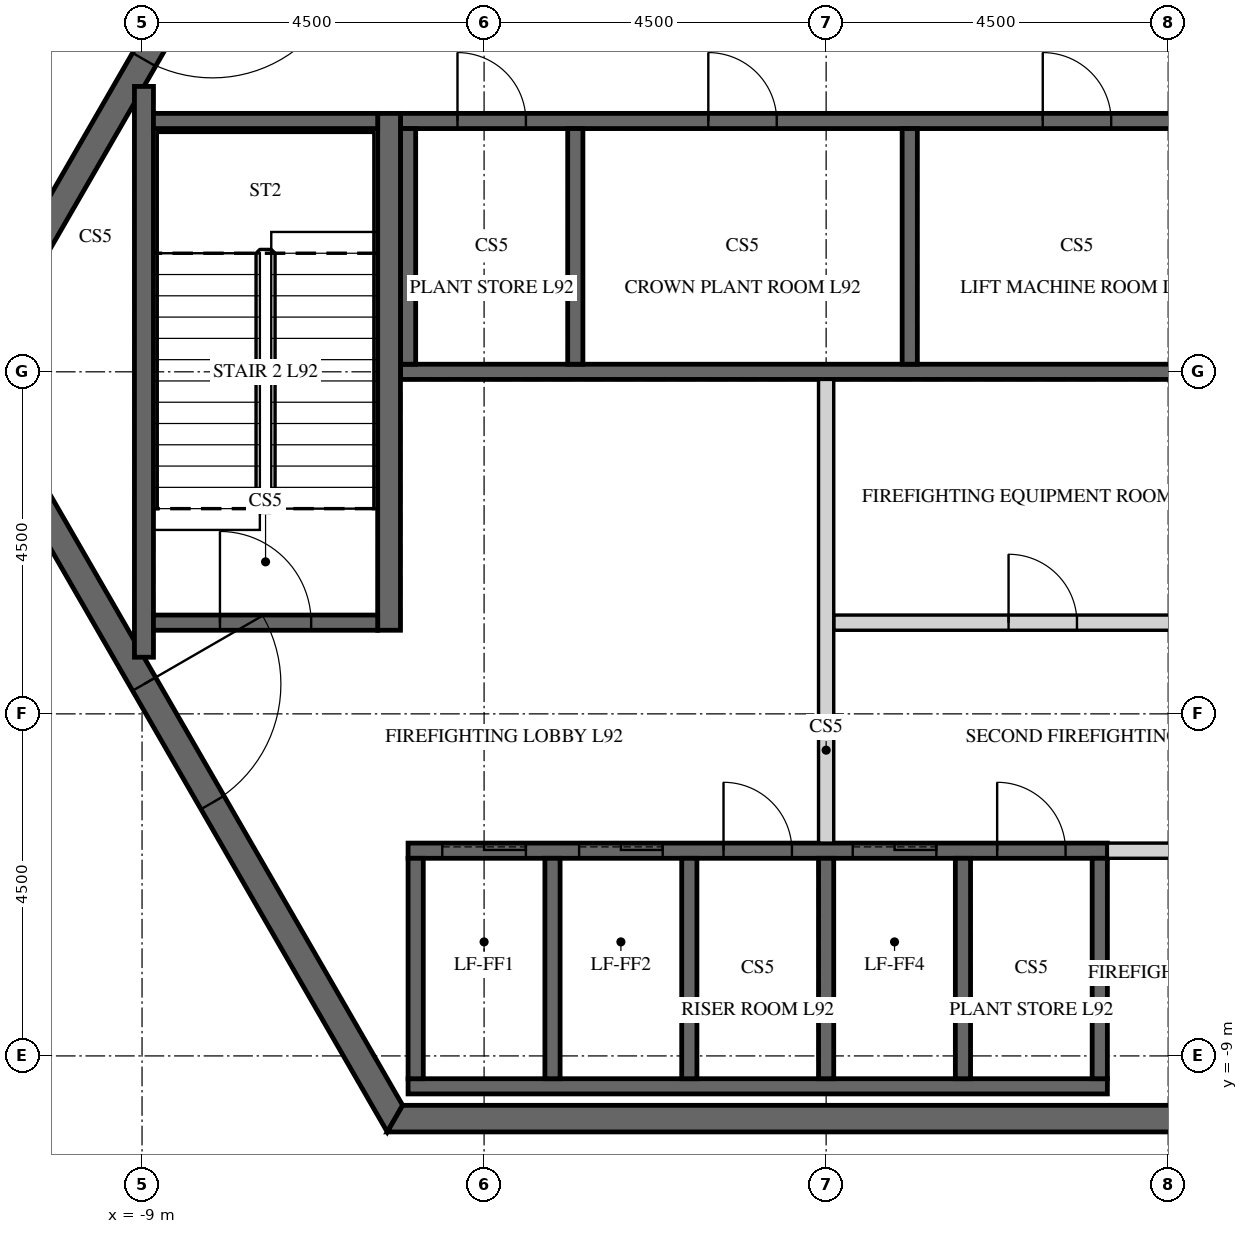
"""IFC4 building model, lengths in metres.
Left out: names, types, materials, properties, quantities, classifications, styles, units other than length and angle.
Written with IfcOpenShell. Run it as: python <this file> out.ifc"""

import sys

from ifc_helpers import new_model, si_unit, direction, frame, frame_2d, origin, place, context, subcontext, project, spatial, polyline, rectangle, outline, extrude, element, fill, save


model = new_model("IFC4")
c1 = context("Model", 3, precision=1e-05, world=origin(), true_north=direction((0.0, 1.0)))
c2 = subcontext(c1, "Body", "Model", "MODEL_VIEW")
j1 = project(units=[si_unit("LENGTHUNIT", "METRE"), si_unit("PLANEANGLEUNIT", "RADIAN")], contexts=[c1])
p1 = place(None, origin())
s1 = spatial("IfcSite", under=j1, at=p1, CompositionType="ELEMENT")
p2 = place(p1, origin())
s2 = spatial("IfcBuilding", under=s1, at=p2, CompositionType="ELEMENT")
p3 = place(p2, frame((0.0, 0.0, 388.2)))
s3 = spatial("IfcBuildingStorey", under=s2, at=p3, CompositionType="ELEMENT", Elevation=388.2)
p4 = place(p3, frame((-5.673, 9.825, -0.2), z_axis=(0.0, 0.0, 1.0), x_axis=(-0.499995046907, -0.866028263435, 0.0)))
e1 = element("IfcWall", 1, at=p4, inside=s3, PredefinedType="SHEAR", context=c2, shape_type="SweptSolid", body=[
    extrude(outline(polyline([(-0.101, -0.175), (11.446, -0.175), (11.244, 0.175), (0.101, 0.175), (-0.101, -0.175)])), origin(), (0.0, 0.0, 1.0), 4.5),
])
p5 = place(p4, frame((4.801, 0.0, 0.2)))
e2 = element("IfcOpeningElement", 2, at=p5, cuts=e1, PredefinedType="OPENING", context=c2, shape_type="SweptSolid", body=[
    extrude(rectangle(XDim=1.8, YDim=2.4, at=frame_2d((0.9, 1.2))), frame((0.0, 0.185, 0.0), z_axis=(0.0, -1.0, 0.0), x_axis=(1.0, 0.0, 0.0)), (0.0, 0.0, 1.0), 0.37),
])
p6 = place(p3, frame((-11.345, 0.0, -0.2), z_axis=(0.0, 0.0, 1.0), x_axis=(0.499995046907, -0.866028263435, 0.0)))
e3 = element("IfcWall", 3, at=p6, inside=s3, PredefinedType="SHEAR", context=c2, shape_type="SweptSolid", body=[
    extrude(outline(polyline([(-0.101, -0.175), (11.446, -0.175), (11.244, 0.175), (0.101, 0.175), (-0.101, -0.175)])), origin(), (0.0, 0.0, 1.0), 4.5),
])
p7 = place(p6, frame((4.744, 0.0, 0.2)))
e4 = element("IfcOpeningElement", 4, at=p7, cuts=e3, PredefinedType="OPENING", context=c2, shape_type="SweptSolid", body=[
    extrude(rectangle(XDim=1.8, YDim=2.4, at=frame_2d((0.9, 1.2))), frame((0.0, 0.185, 0.0), z_axis=(0.0, -1.0, 0.0), x_axis=(1.0, 0.0, 0.0)), (0.0, 0.0, 1.0), 0.37),
])
p8 = place(p3, frame((-5.673, -9.825, -0.2), z_axis=(0.0, 0.0, 1.0), x_axis=(1.0, 0.0, 0.0)))
e5 = element("IfcWall", 5, at=p8, inside=s3, PredefinedType="SHEAR", context=c2, shape_type="SweptSolid", body=[
    extrude(outline(polyline([(-0.101, -0.175), (11.446, -0.175), (11.244, 0.175), (0.101, 0.175), (-0.101, -0.175)])), origin(), (0.0, 0.0, 1.0), 4.5),
])
p9 = place(p3, frame((-5.6, 3.3, -0.2), z_axis=(0.0, 0.0, 1.0), x_axis=(1.0, 0.0, 0.0)))
e6 = element("IfcWall", 6, at=p9, inside=s3, PredefinedType="SHEAR", context=c2, shape_type="SweptSolid", body=[
    extrude(rectangle(XDim=11.2, YDim=0.2, at=frame_2d((5.6, 0.0))), origin(), (0.0, 0.0, 1.0), 4.5),
])
p10 = place(p9, frame((0.75, 0.0, 0.2)))
e7 = element("IfcOpeningElement", 7, at=p10, cuts=e6, PredefinedType="OPENING", context=c2, shape_type="SweptSolid", body=[
    extrude(rectangle(XDim=0.9, YDim=2.1, at=frame_2d((0.45, 1.05))), frame((0.0, 0.11, 0.0), z_axis=(0.0, -1.0, 0.0), x_axis=(1.0, 0.0, 0.0)), (0.0, 0.0, 1.0), 0.22),
])
p11 = place(p9, frame((4.05, 0.0, 0.2)))
e8 = element("IfcOpeningElement", 8, at=p11, cuts=e6, PredefinedType="OPENING", context=c2, shape_type="SweptSolid", body=[
    extrude(rectangle(XDim=0.9, YDim=2.1, at=frame_2d((0.45, 1.05))), frame((0.0, 0.11, 0.0), z_axis=(0.0, -1.0, 0.0), x_axis=(1.0, 0.0, 0.0)), (0.0, 0.0, 1.0), 0.22),
])
p12 = place(p9, frame((8.45, 0.0, 0.2)))
e9 = element("IfcOpeningElement", 9, at=p12, cuts=e6, PredefinedType="OPENING", context=c2, shape_type="SweptSolid", body=[
    extrude(rectangle(XDim=0.9, YDim=2.1, at=frame_2d((0.45, 1.05))), frame((0.0, 0.11, 0.0), z_axis=(0.0, -1.0, 0.0), x_axis=(1.0, 0.0, 0.0)), (0.0, 0.0, 1.0), 0.22),
])
p13 = place(p3, frame((-5.6, 0.0, -0.2), z_axis=(0.0, 0.0, 1.0), x_axis=(1.0, 0.0, 0.0)))
e10 = element("IfcWall", 10, at=p13, inside=s3, PredefinedType="SHEAR", context=c2, shape_type="SweptSolid", body=[
    extrude(rectangle(XDim=11.2, YDim=0.2, at=frame_2d((5.6, 0.0))), origin(), (0.0, 0.0, 1.0), 4.5),
])
for number, where, z_axis, x_axis in (
    (11, (-5.5, 0.1, -0.2), (0.0, 0.0, 1.0), (0.0, 1.0, 0.0)),
    (12, (-3.3, 0.1, -0.2), (0.0, 0.0, 1.0), (0.0, 1.0, 0.0)),
    (13, (1.1, 0.1, -0.2), (0.0, 0.0, 1.0), (0.0, 1.0, 0.0)),
):
    element("IfcWall", number, at=place(p3, frame(where, z_axis=z_axis, x_axis=x_axis)), inside=s3, PredefinedType="SHEAR", context=c2, shape_type="SweptSolid", body=[
        extrude(rectangle(XDim=3.1, YDim=0.2, at=frame_2d((1.55, 0.0))), origin(), (0.0, 0.0, 1.0), 4.5),
    ])
p14 = place(p3, frame((-5.5, -6.3, -0.2), z_axis=(0.0, 0.0, 1.0), x_axis=(1.0, 0.0, 0.0)))
e14 = element("IfcWall", 14, at=p14, inside=s3, PredefinedType="SHEAR", context=c2, shape_type="SweptSolid", body=[
    extrude(rectangle(XDim=9.2, YDim=0.2, at=frame_2d((4.6, 0.0))), origin(), (0.0, 0.0, 1.0), 4.5),
])
p15 = place(p14, frame((4.15, 0.0, 0.2)))
e15 = element("IfcOpeningElement", 15, at=p15, cuts=e14, PredefinedType="OPENING", context=c2, shape_type="SweptSolid", body=[
    extrude(rectangle(XDim=0.9, YDim=2.1, at=frame_2d((0.45, 1.05))), frame((0.0, 0.11, 0.0), z_axis=(0.0, -1.0, 0.0), x_axis=(1.0, 0.0, 0.0)), (0.0, 0.0, 1.0), 0.22),
])
p16 = place(p14, frame((7.75, 0.0, 0.2)))
e16 = element("IfcOpeningElement", 16, at=p16, cuts=e14, PredefinedType="OPENING", context=c2, shape_type="SweptSolid", body=[
    extrude(rectangle(XDim=0.9, YDim=2.1, at=frame_2d((0.45, 1.05))), frame((0.0, 0.11, 0.0), z_axis=(0.0, -1.0, 0.0), x_axis=(1.0, 0.0, 0.0)), (0.0, 0.0, 1.0), 0.22),
])
p17 = place(p14, frame((0.45, 0.0, 0.2)))
e17 = element("IfcOpeningElement", 17, at=p17, cuts=e14, PredefinedType="OPENING", context=c2, shape_type="SweptSolid", body=[
    extrude(rectangle(XDim=1.1, YDim=2.1, at=frame_2d((0.55, 1.05))), frame((0.0, 0.11, 0.0), z_axis=(0.0, -1.0, 0.0), x_axis=(1.0, 0.0, 0.0)), (0.0, 0.0, 1.0), 0.22),
])
p18 = place(p14, frame((2.25, 0.0, 0.2)))
e18 = element("IfcOpeningElement", 18, at=p18, cuts=e14, PredefinedType="OPENING", context=c2, shape_type="SweptSolid", body=[
    extrude(rectangle(XDim=1.1, YDim=2.1, at=frame_2d((0.55, 1.05))), frame((0.0, 0.11, 0.0), z_axis=(0.0, -1.0, 0.0), x_axis=(1.0, 0.0, 0.0)), (0.0, 0.0, 1.0), 0.22),
])
p19 = place(p14, frame((5.85, 0.0, 0.2)))
e19 = element("IfcOpeningElement", 19, at=p19, cuts=e14, PredefinedType="OPENING", context=c2, shape_type="SweptSolid", body=[
    extrude(rectangle(XDim=1.1, YDim=2.1, at=frame_2d((0.55, 1.05))), frame((0.0, 0.11, 0.0), z_axis=(0.0, -1.0, 0.0), x_axis=(1.0, 0.0, 0.0)), (0.0, 0.0, 1.0), 0.22),
])
p20 = place(p3, frame((-5.5, -9.4, -0.2), z_axis=(0.0, 0.0, 1.0), x_axis=(1.0, 0.0, 0.0)))
e20 = element("IfcWall", 20, at=p20, inside=s3, PredefinedType="SHEAR", context=c2, shape_type="SweptSolid", body=[
    extrude(rectangle(XDim=9.2, YDim=0.2, at=frame_2d((4.6, 0.0))), origin(), (0.0, 0.0, 1.0), 4.5),
])
for number, where, z_axis, x_axis in (
    (21, (-5.4, -9.3, -0.2), (0.0, 0.0, 1.0), (0.0, 1.0, 0.0)),
    (22, (-3.6, -9.3, -0.2), (0.0, 0.0, 1.0), (0.0, 1.0, 0.0)),
    (23, (-1.8, -9.3, -0.2), (0.0, 0.0, 1.0), (0.0, 1.0, 0.0)),
    (24, (0.0, -9.3, -0.2), (0.0, 0.0, 1.0), (0.0, 1.0, 0.0)),
    (25, (1.8, -9.3, -0.2), (0.0, 0.0, 1.0), (0.0, 1.0, 0.0)),
    (26, (3.6, -9.3, -0.2), (0.0, 0.0, 1.0), (0.0, 1.0, 0.0)),
):
    element("IfcWall", number, at=place(p3, frame(where, z_axis=z_axis, x_axis=x_axis)), inside=s3, PredefinedType="SHEAR", context=c2, shape_type="SweptSolid", body=[
        extrude(rectangle(XDim=2.9, YDim=0.2, at=frame_2d((1.45, 0.0))), origin(), (0.0, 0.0, 1.0), 4.5),
    ])
p21 = place(p3, frame((0.1, -3.3, 0.0), z_axis=(0.0, 0.0, 1.0), x_axis=(1.0, 0.0, 0.0)))
e27 = element("IfcWall", 27, at=p21, inside=s3, PredefinedType="PARTITIONING", context=c2, shape_type="SweptSolid", body=[
    extrude(rectangle(XDim=5.5, YDim=0.2, at=frame_2d((2.75, 0.0))), origin(), (0.0, 0.0, 1.0), 4.3),
])
p22 = place(p21, frame((2.3, 0.0, 0.0)))
e28 = element("IfcOpeningElement", 28, at=p22, cuts=e27, PredefinedType="OPENING", context=c2, shape_type="SweptSolid", body=[
    extrude(rectangle(XDim=0.9, YDim=2.1, at=frame_2d((0.45, 1.05))), frame((0.0, 0.11, 0.0), z_axis=(0.0, -1.0, 0.0), x_axis=(1.0, 0.0, 0.0)), (0.0, 0.0, 1.0), 0.22),
])
p23 = place(p3, frame((0.0, -6.2, 0.0), z_axis=(0.0, 0.0, 1.0), x_axis=(0.0, 1.0, 0.0)))
e29 = element("IfcWall", 29, at=p23, inside=s3, PredefinedType="PARTITIONING", context=c2, shape_type="SweptSolid", body=[
    extrude(rectangle(XDim=6.1, YDim=0.2, at=frame_2d((3.05, 0.0))), origin(), (0.0, 0.0, 1.0), 4.3),
])
p24 = place(p3, frame((3.7, -6.3, 0.0), z_axis=(0.0, 0.0, 1.0), x_axis=(1.0, 0.0, 0.0)))
e30 = element("IfcWall", 30, at=p24, inside=s3, PredefinedType="PARTITIONING", context=c2, shape_type="SweptSolid", body=[
    extrude(rectangle(XDim=3.806, YDim=0.2, at=frame_2d((1.903, 0.0))), origin(), (0.0, 0.0, 1.0), 4.3),
])
p25 = place(p24, frame((1.453, 0.0, 0.0)))
e31 = element("IfcOpeningElement", 31, at=p25, cuts=e30, PredefinedType="OPENING", context=c2, shape_type="SweptSolid", body=[
    extrude(rectangle(XDim=0.9, YDim=2.1, at=frame_2d((0.45, 1.05))), frame((0.0, 0.11, 0.0), z_axis=(0.0, -1.0, 0.0), x_axis=(1.0, 0.0, 0.0)), (0.0, 0.0, 1.0), 0.22),
])
p26 = place(p3, frame((-5.75, -3.4, -0.2), z_axis=(0.0, 0.0, 1.0), x_axis=(0.0, 1.0, 0.0)))
e32 = element("IfcWall", 32, at=p26, inside=s3, PredefinedType="SHEAR", context=c2, shape_type="SweptSolid", body=[
    extrude(rectangle(XDim=6.8, YDim=0.3, at=frame_2d((3.4, 0.0))), origin(), (0.0, 0.0, 1.0), 4.5),
])
p27 = place(p3, frame((-8.975, -3.755, -0.2), z_axis=(0.0, 0.0, 1.0), x_axis=(0.0, 1.0, 0.0)))
e33 = element("IfcWall", 33, at=p27, inside=s3, PredefinedType="SHEAR", context=c2, shape_type="SweptSolid", body=[
    extrude(rectangle(XDim=7.51, YDim=0.25, at=frame_2d((3.755, 0.0))), origin(), (0.0, 0.0, 1.0), 4.5),
])
p28 = place(p3, frame((-8.85, 3.3, -0.2), z_axis=(0.0, 0.0, 1.0), x_axis=(1.0, 0.0, 0.0)))
e34 = element("IfcWall", 34, at=p28, inside=s3, PredefinedType="SHEAR", context=c2, shape_type="SweptSolid", body=[
    extrude(rectangle(XDim=2.95, YDim=0.2, at=frame_2d((1.475, 0.0))), origin(), (0.0, 0.0, 1.0), 4.5),
])
p29 = place(p3, frame((-8.85, -3.3, -0.2), z_axis=(0.0, 0.0, 1.0), x_axis=(1.0, 0.0, 0.0)))
e35 = element("IfcWall", 35, at=p29, inside=s3, PredefinedType="SHEAR", context=c2, shape_type="SweptSolid", body=[
    extrude(rectangle(XDim=2.95, YDim=0.2, at=frame_2d((1.475, 0.0))), origin(), (0.0, 0.0, 1.0), 4.5),
])
p30 = place(p29, frame((0.875, 0.0, 0.2)))
e36 = element("IfcOpeningElement", 36, at=p30, cuts=e35, PredefinedType="OPENING", context=c2, shape_type="SweptSolid", body=[
    extrude(rectangle(XDim=1.2, YDim=2.4, at=frame_2d((0.6, 1.2))), frame((0.0, 0.11, 0.0), z_axis=(0.0, -1.0, 0.0), x_axis=(1.0, 0.0, 0.0)), (0.0, 0.0, 1.0), 0.22),
])
p31 = place(p3, frame((-18.79, -0.175, 0.0), z_axis=(0.0, 0.0, 1.0), x_axis=(0.500020978615, -0.866013291437, 0.0)))
e37 = element("IfcWall", 37, at=p31, inside=s3, PredefinedType="PARTITIONING", context=c2, shape_type="SweptSolid", body=[
    extrude(rectangle(XDim=18.689, YDim=0.2, at=frame_2d((9.345, 0.0))), origin(), (0.0, 0.0, 1.0), 3.692),
])
p32 = place(p31, frame((8.745, 0.0, 0.0)))
e38 = element("IfcOpeningElement", 38, at=p32, cuts=e37, PredefinedType="OPENING", context=c2, shape_type="SweptSolid", body=[
    extrude(rectangle(XDim=1.2, YDim=2.1, at=frame_2d((0.6, 1.05))), frame((0.0, 0.11, 0.0), z_axis=(0.0, -1.0, 0.0), x_axis=(1.0, 0.0, 0.0)), (0.0, 0.0, 1.0), 0.22),
])
p33 = place(p3, frame((-9.445, 16.36, 0.0), z_axis=(0.0, 0.0, 1.0), x_axis=(-0.500020978615, -0.866013291437, 0.0)))
e39 = element("IfcWall", 39, at=p33, inside=s3, PredefinedType="PARTITIONING", context=c2, shape_type="SweptSolid", body=[
    extrude(rectangle(XDim=18.689, YDim=0.2, at=frame_2d((9.345, 0.0))), origin(), (0.0, 0.0, 1.0), 3.692),
])
p34 = place(p33, frame((8.745, 0.0, 0.0)))
e40 = element("IfcOpeningElement", 40, at=p34, cuts=e39, PredefinedType="OPENING", context=c2, shape_type="SweptSolid", body=[
    extrude(rectangle(XDim=1.2, YDim=2.1, at=frame_2d((0.6, 1.05))), frame((0.0, 0.11, 0.0), z_axis=(0.0, -1.0, 0.0), x_axis=(1.0, 0.0, 0.0)), (0.0, 0.0, 1.0), 0.22),
])
p35 = place(p5, origin())
e41 = element("IfcDoor", 41, at=p35, inside=s3, OperationType="DOUBLE_DOOR_SINGLE_SWING", PredefinedType="DOOR", context=c2, shape_type="SweptSolid", body=[
    extrude(rectangle(XDim=1.8, YDim=2.4, at=frame_2d((0.9, 1.2))), frame((0.0, 0.025, 0.0), z_axis=(0.0, -1.0, 0.0), x_axis=(1.0, 0.0, 0.0)), (0.0, 0.0, 1.0), 0.05),
])
fill(e2, e41)
p36 = place(p7, origin())
e42 = element("IfcDoor", 42, at=p36, inside=s3, OperationType="DOUBLE_DOOR_SINGLE_SWING", PredefinedType="DOOR", context=c2, shape_type="SweptSolid", body=[
    extrude(rectangle(XDim=1.8, YDim=2.4, at=frame_2d((0.9, 1.2))), frame((0.0, 0.025, 0.0), z_axis=(0.0, -1.0, 0.0), x_axis=(1.0, 0.0, 0.0)), (0.0, 0.0, 1.0), 0.05),
])
fill(e4, e42)
p37 = place(p22, origin())
e43 = element("IfcDoor", 43, at=p37, inside=s3, OperationType="SINGLE_SWING_LEFT", PredefinedType="DOOR", context=c2, shape_type="SweptSolid", body=[
    extrude(rectangle(XDim=0.9, YDim=2.1, at=frame_2d((0.45, 1.05))), frame((0.0, 0.025, 0.0), z_axis=(0.0, -1.0, 0.0), x_axis=(1.0, 0.0, 0.0)), (0.0, 0.0, 1.0), 0.05),
])
fill(e28, e43)
p38 = place(p10, origin())
e44 = element("IfcDoor", 44, at=p38, inside=s3, OperationType="SINGLE_SWING_LEFT", PredefinedType="DOOR", context=c2, shape_type="SweptSolid", body=[
    extrude(rectangle(XDim=0.9, YDim=2.1, at=frame_2d((0.45, 1.05))), frame((0.0, 0.025, 0.0), z_axis=(0.0, -1.0, 0.0), x_axis=(1.0, 0.0, 0.0)), (0.0, 0.0, 1.0), 0.05),
])
fill(e7, e44)
p39 = place(p11, origin())
e45 = element("IfcDoor", 45, at=p39, inside=s3, OperationType="SINGLE_SWING_LEFT", PredefinedType="DOOR", context=c2, shape_type="SweptSolid", body=[
    extrude(rectangle(XDim=0.9, YDim=2.1, at=frame_2d((0.45, 1.05))), frame((0.0, 0.025, 0.0), z_axis=(0.0, -1.0, 0.0), x_axis=(1.0, 0.0, 0.0)), (0.0, 0.0, 1.0), 0.05),
])
fill(e8, e45)
p40 = place(p12, origin())
e46 = element("IfcDoor", 46, at=p40, inside=s3, OperationType="SINGLE_SWING_LEFT", PredefinedType="DOOR", context=c2, shape_type="SweptSolid", body=[
    extrude(rectangle(XDim=0.9, YDim=2.1, at=frame_2d((0.45, 1.05))), frame((0.0, 0.025, 0.0), z_axis=(0.0, -1.0, 0.0), x_axis=(1.0, 0.0, 0.0)), (0.0, 0.0, 1.0), 0.05),
])
fill(e9, e46)
p41 = place(p15, origin())
e47 = element("IfcDoor", 47, at=p41, inside=s3, OperationType="SINGLE_SWING_LEFT", PredefinedType="DOOR", context=c2, shape_type="SweptSolid", body=[
    extrude(rectangle(XDim=0.9, YDim=2.1, at=frame_2d((0.45, 1.05))), frame((0.0, 0.025, 0.0), z_axis=(0.0, -1.0, 0.0), x_axis=(1.0, 0.0, 0.0)), (0.0, 0.0, 1.0), 0.05),
])
fill(e15, e47)
p42 = place(p16, origin())
e48 = element("IfcDoor", 48, at=p42, inside=s3, OperationType="SINGLE_SWING_LEFT", PredefinedType="DOOR", context=c2, shape_type="SweptSolid", body=[
    extrude(rectangle(XDim=0.9, YDim=2.1, at=frame_2d((0.45, 1.05))), frame((0.0, 0.025, 0.0), z_axis=(0.0, -1.0, 0.0), x_axis=(1.0, 0.0, 0.0)), (0.0, 0.0, 1.0), 0.05),
])
fill(e16, e48)
p43 = place(p30, origin())
e49 = element("IfcDoor", 49, at=p43, inside=s3, OperationType="SINGLE_SWING_LEFT", PredefinedType="DOOR", context=c2, shape_type="SweptSolid", body=[
    extrude(rectangle(XDim=1.2, YDim=2.4, at=frame_2d((0.6, 1.2))), frame((0.0, 0.025, 0.0), z_axis=(0.0, -1.0, 0.0), x_axis=(1.0, 0.0, 0.0)), (0.0, 0.0, 1.0), 0.05),
])
fill(e36, e49)
p44 = place(p17, origin())
e50 = element("IfcDoor", 50, at=p44, inside=s3, OperationType="SLIDING_TO_LEFT", PredefinedType="DOOR", context=c2, shape_type="SweptSolid", body=[
    extrude(rectangle(XDim=1.1, YDim=2.1, at=frame_2d((0.55, 1.05))), frame((0.0, 0.025, 0.0), z_axis=(0.0, -1.0, 0.0), x_axis=(1.0, 0.0, 0.0)), (0.0, 0.0, 1.0), 0.05),
])
fill(e17, e50)
p45 = place(p18, origin())
e51 = element("IfcDoor", 51, at=p45, inside=s3, OperationType="SLIDING_TO_LEFT", PredefinedType="DOOR", context=c2, shape_type="SweptSolid", body=[
    extrude(rectangle(XDim=1.1, YDim=2.1, at=frame_2d((0.55, 1.05))), frame((0.0, 0.025, 0.0), z_axis=(0.0, -1.0, 0.0), x_axis=(1.0, 0.0, 0.0)), (0.0, 0.0, 1.0), 0.05),
])
fill(e18, e51)
p46 = place(p19, origin())
e52 = element("IfcDoor", 52, at=p46, inside=s3, OperationType="SLIDING_TO_LEFT", PredefinedType="DOOR", context=c2, shape_type="SweptSolid", body=[
    extrude(rectangle(XDim=1.1, YDim=2.1, at=frame_2d((0.55, 1.05))), frame((0.0, 0.025, 0.0), z_axis=(0.0, -1.0, 0.0), x_axis=(1.0, 0.0, 0.0)), (0.0, 0.0, 1.0), 0.05),
])
fill(e19, e52)
save(model, sys.argv[1])
